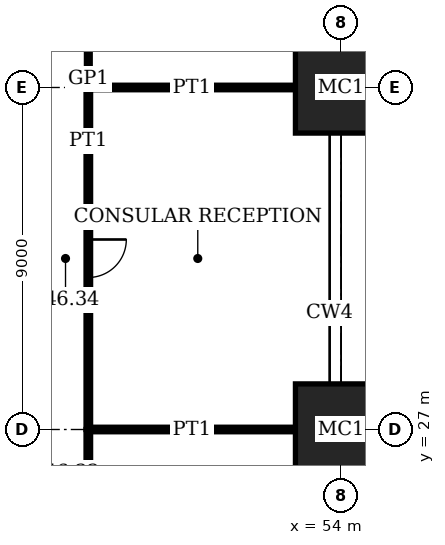
"""IFC4 building model, lengths in metres.
Left out: names, types, materials, properties, quantities, classifications, styles, units other than length and angle.
Written with IfcOpenShell. Run it as: python <this file> out.ifc"""

import sys

from ifc_helpers import new_model, si_unit, direction, frame, frame_2d, origin, origin_2d, place, context, subcontext, project, spatial, rectangle, extrude, element, fill, save


model = new_model("IFC4")
c1 = context("Model", 3, precision=1e-05, world=origin(), true_north=direction((0.0, 1.0)))
c2 = subcontext(c1, "Body", "Model", "MODEL_VIEW")
j1 = project(units=[si_unit("LENGTHUNIT", "METRE"), si_unit("PLANEANGLEUNIT", "RADIAN")], contexts=[c1])
p1 = place(None, origin())
s1 = spatial("IfcSite", under=j1, at=p1, CompositionType="ELEMENT")
p2 = place(p1, origin())
s2 = spatial("IfcBuilding", under=s1, at=p2, CompositionType="ELEMENT")
p3 = place(p2, frame((0.0, 0.0, 190.2)))
s3 = spatial("IfcBuildingStorey", under=s2, at=p3, CompositionType="ELEMENT", Elevation=190.2)
for number, where, z_axis, x_axis in (
    (1, (54.0, 27.0, 0.0), (0.0, 0.0, 1.0), (1.0, 0.0, 0.0)),
    (2, (54.0, 36.0, 0.0), (0.0, 0.0, 1.0), (1.0, 0.0, 0.0)),
):
    element("IfcColumn", number, at=place(p3, frame(where, z_axis=z_axis, x_axis=x_axis)), inside=s3, PredefinedType="COLUMN", context=c2, shape_type="SweptSolid", body=[
        extrude(rectangle(XDim=2.4, YDim=2.4, at=origin_2d()), origin(), (0.0, 0.0, 1.0), 4.0),
    ])
for number, where, z_axis, x_axis in (
    (3, (47.35, 27.0, 0.0), (0.0, 0.0, 1.0), (1.0, 0.0, 0.0)),
    (4, (47.35, 36.0, 0.0), (0.0, 0.0, 1.0), (1.0, 0.0, 0.0)),
):
    element("IfcWall", number, at=place(p3, frame(where, z_axis=z_axis, x_axis=x_axis)), inside=s3, PredefinedType="PARTITIONING", context=c2, shape_type="SweptSolid", body=[
        extrude(rectangle(XDim=5.45, YDim=0.12, at=frame_2d((2.725, 0.0))), origin(), (0.0, 0.0, 1.0), 3.05),
    ])
p4 = place(p3, frame((47.35, 22.5, 0.0), z_axis=(0.0, 0.0, 1.0), x_axis=(0.0, 1.0, 0.0)))
e5 = element("IfcWall", 5, at=p4, inside=s3, PredefinedType="PARTITIONING", context=c2, shape_type="SweptSolid", body=[
    extrude(rectangle(XDim=4.5, YDim=0.12, at=frame_2d((2.25, 0.0))), origin(), (0.0, 0.0, 1.0), 3.75),
])
p5 = place(p4, frame((1.75, 0.0, 0.0)))
e6 = element("IfcOpeningElement", 6, at=p5, cuts=e5, PredefinedType="OPENING", context=c2, shape_type="SweptSolid", body=[
    extrude(rectangle(XDim=1.0, YDim=2.4, at=frame_2d((0.5, 1.2))), frame((0.0, 0.07, 0.0), z_axis=(0.0, -1.0, 0.0), x_axis=(1.0, 0.0, 0.0)), (0.0, 0.0, 1.0), 0.14),
])
p6 = place(p3, frame((47.35, 27.0, 0.0), z_axis=(0.0, 0.0, 1.0), x_axis=(0.0, 1.0, 0.0)))
e7 = element("IfcWall", 7, at=p6, inside=s3, PredefinedType="PARTITIONING", context=c2, shape_type="SweptSolid", body=[
    extrude(rectangle(XDim=9.0, YDim=0.12, at=frame_2d((4.5, 0.0))), origin(), (0.0, 0.0, 1.0), 3.75),
])
p7 = place(p6, frame((4.0, 0.0, 0.0)))
e8 = element("IfcOpeningElement", 8, at=p7, cuts=e7, PredefinedType="OPENING", context=c2, shape_type="SweptSolid", body=[
    extrude(rectangle(XDim=1.0, YDim=2.4, at=frame_2d((0.5, 1.2))), frame((0.0, 0.07, 0.0), z_axis=(0.0, -1.0, 0.0), x_axis=(1.0, 0.0, 0.0)), (0.0, 0.0, 1.0), 0.14),
])
p8 = place(p3, frame((47.35, 36.0, 0.0), z_axis=(0.0, 0.0, 1.0), x_axis=(0.0, 1.0, 0.0)))
e9 = element("IfcWall", 9, at=p8, inside=s3, PredefinedType="PARTITIONING", context=c2, shape_type="SweptSolid", body=[
    extrude(rectangle(XDim=2.35, YDim=0.1, at=frame_2d((1.175, 0.0))), origin(), (0.0, 0.0, 1.0), 3.75),
])
p9 = place(p7, origin())
e10 = element("IfcDoor", 10, at=p9, inside=s3, OperationType="SINGLE_SWING_RIGHT", PredefinedType="DOOR", context=c2, shape_type="SweptSolid", body=[
    extrude(rectangle(XDim=1.0, YDim=2.4, at=frame_2d((0.5, 1.2))), frame((0.0, 0.025, 0.0), z_axis=(0.0, -1.0, 0.0), x_axis=(1.0, 0.0, 0.0)), (0.0, 0.0, 1.0), 0.05),
])
fill(e8, e10)
save(model, sys.argv[1])
